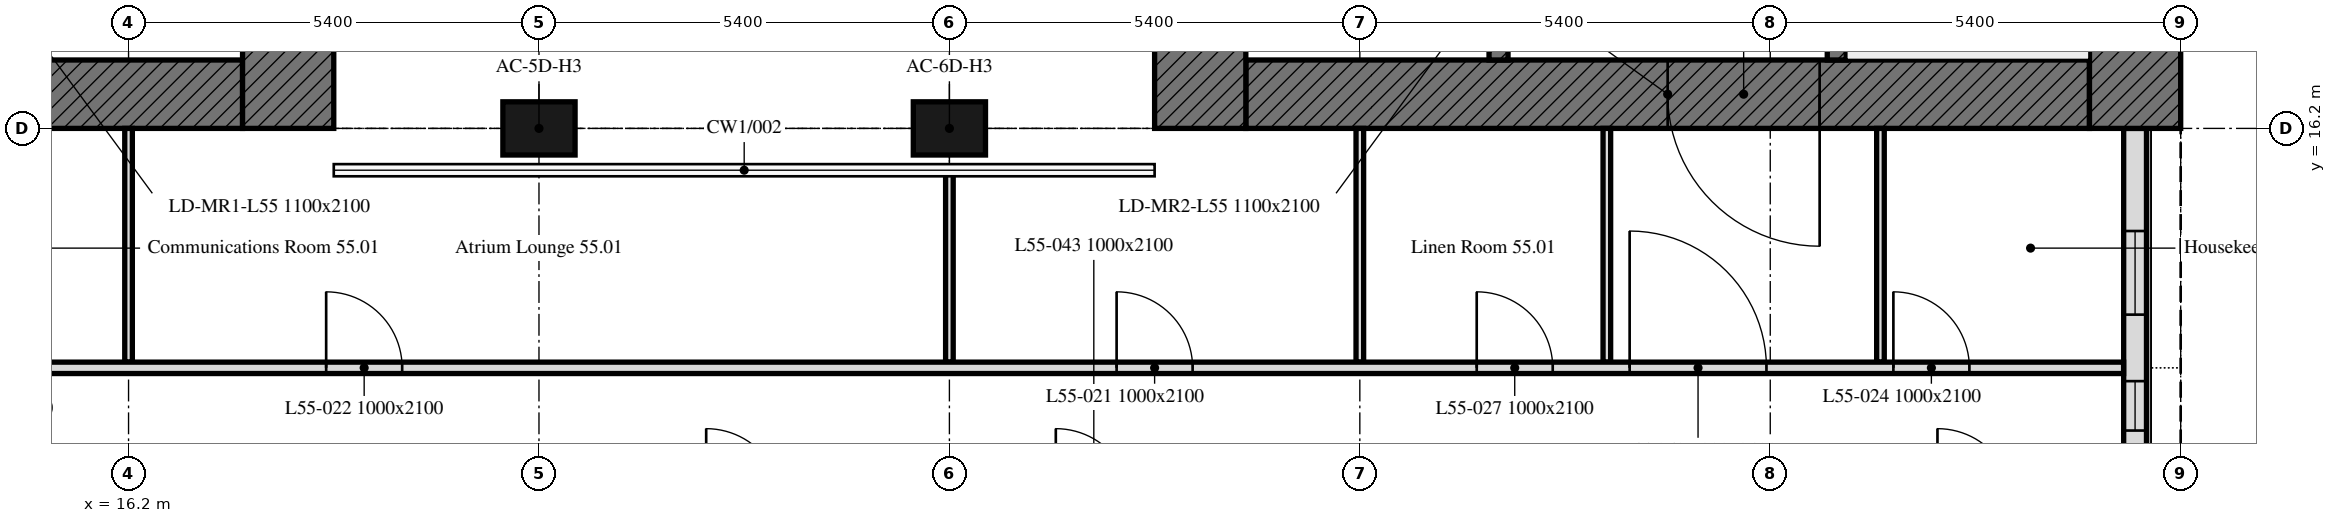
"""IFC4 building model, lengths in metres.
Left out: names, types, materials, properties, quantities, classifications, styles, units other than length and angle.
Written with IfcOpenShell. Run it as: python <this file> out.ifc"""

import sys

from ifc_helpers import new_model, si_unit, direction, frame, frame_2d, origin, origin_2d, place, context, subcontext, project, spatial, rectangle, extrude, element, fill, save


model = new_model("IFC4")
c1 = context("Model", 3, precision=1e-05, world=origin(), true_north=direction((0.0, 1.0)))
c2 = subcontext(c1, "Body", "Model", "MODEL_VIEW")
j1 = project(units=[si_unit("LENGTHUNIT", "METRE"), si_unit("PLANEANGLEUNIT", "RADIAN")], contexts=[c1])
p1 = place(None, origin())
s1 = spatial("IfcSite", under=j1, at=p1, CompositionType="ELEMENT")
p2 = place(p1, origin())
s2 = spatial("IfcBuilding", under=s1, at=p2, CompositionType="ELEMENT")
p3 = place(p2, frame((0.0, 0.0, 220.3)))
s3 = spatial("IfcBuildingStorey", under=s2, at=p3, CompositionType="ELEMENT", Elevation=220.3)
for number, where, z_axis, x_axis in (
    (1, (21.6, 16.2, 0.0), (0.0, 0.0, 1.0), (1.0, 0.0, 0.0)),
    (2, (27.0, 16.2, 0.0), (0.0, 0.0, 1.0), (1.0, 0.0, 0.0)),
):
    element("IfcColumn", number, at=place(p3, frame(where, z_axis=z_axis, x_axis=x_axis)), inside=s3, PredefinedType="COLUMN", context=c2, shape_type="SweptSolid", body=[
        extrude(rectangle(XDim=0.95, YDim=0.7, at=origin_2d()), origin(), (0.0, 0.0, 1.0), 3.0),
    ])
p4 = place(p3, frame((42.6, 10.986, 0.0), z_axis=(0.0, 0.0, 1.0), x_axis=(0.0, 1.0, 0.0)))
e3 = element("IfcWall", 3, at=p4, inside=s3, PredefinedType="SOLIDWALL", context=c2, shape_type="SweptSolid", body=[
    extrude(rectangle(XDim=5.214, YDim=0.3, at=frame_2d((2.607, 0.0))), origin(), (0.0, 0.0, 1.0), 3.0),
])
p5 = place(p4, frame((1.239, 0.0, 0.9)))
e4 = element("IfcOpeningElement", 4, at=p5, cuts=e3, PredefinedType="OPENING", context=c2, shape_type="SweptSolid", body=[
    extrude(rectangle(XDim=0.65, YDim=1.7, at=frame_2d((0.325, 0.85))), frame((0.0, 0.16, 0.0), z_axis=(0.0, -1.0, 0.0), x_axis=(1.0, 0.0, 0.0)), (0.0, 0.0, 1.0), 0.32),
])
p6 = place(p4, frame((2.764, 0.0, 0.9)))
e5 = element("IfcOpeningElement", 5, at=p6, cuts=e3, PredefinedType="OPENING", context=c2, shape_type="SweptSolid", body=[
    extrude(rectangle(XDim=1.1, YDim=1.7, at=frame_2d((0.55, 0.85))), frame((0.0, 0.16, 0.0), z_axis=(0.0, -1.0, 0.0), x_axis=(1.0, 0.0, 0.0)), (0.0, 0.0, 1.0), 0.32),
])
p7 = place(p3, frame((17.7, 16.65, 0.0), z_axis=(0.0, 0.0, 1.0), x_axis=(-1.0, 0.0, 0.0)))
e6 = element("IfcWall", 6, at=p7, inside=s3, PredefinedType="SOLIDWALL", context=c2, shape_type="SweptSolid", body=[
    extrude(rectangle(XDim=11.1, YDim=0.9, at=frame_2d((5.55, 0.0))), origin(), (0.0, 0.0, 1.0), 3.0),
])
p8 = place(p7, frame((5.55, 0.0, 0.0)))
e7 = element("IfcOpeningElement", 7, at=p8, cuts=e6, PredefinedType="OPENING", context=c2, shape_type="SweptSolid", body=[
    extrude(rectangle(XDim=2.0, YDim=2.4, at=frame_2d((1.0, 1.2))), frame((0.0, 0.45, 0.0), z_axis=(0.0, -1.0, 0.0), x_axis=(1.0, 0.0, 0.0)), (0.0, 0.0, 1.0), 0.9),
])
p9 = place(p3, frame((18.3, 32.4, 0.0), z_axis=(0.0, 0.0, 1.0), x_axis=(0.0, -1.0, 0.0)))
e8 = element("IfcWall", 8, at=p9, inside=s3, PredefinedType="SOLIDWALL", context=c2, shape_type="SweptSolid", body=[
    extrude(rectangle(XDim=16.2, YDim=1.2, at=frame_2d((8.1, 0.0))), origin(), (0.0, 0.0, 1.0), 3.0),
])
p10 = place(p3, frame((42.0, 16.65, 0.0), z_axis=(0.0, 0.0, 1.0), x_axis=(-1.0, 0.0, 0.0)))
e9 = element("IfcWall", 9, at=p10, inside=s3, PredefinedType="SOLIDWALL", context=c2, shape_type="SweptSolid", body=[
    extrude(rectangle(XDim=11.1, YDim=0.9, at=frame_2d((5.55, 0.0))), origin(), (0.0, 0.0, 1.0), 3.0),
])
p11 = place(p10, frame((3.55, 0.0, 0.0)))
e10 = element("IfcOpeningElement", 10, at=p11, cuts=e9, PredefinedType="OPENING", context=c2, shape_type="SweptSolid", body=[
    extrude(rectangle(XDim=2.0, YDim=2.4, at=frame_2d((1.0, 1.2))), frame((0.0, 0.45, 0.0), z_axis=(0.0, -1.0, 0.0), x_axis=(1.0, 0.0, 0.0)), (0.0, 0.0, 1.0), 0.9),
])
for number, where, z_axis, x_axis in (
    (11, (42.6, 32.4, 0.0), (0.0, 0.0, 1.0), (0.0, -1.0, 0.0)),
    (12, (30.3, 16.2, 0.0), (0.0, 0.0, 1.0), (0.0, 1.0, 0.0)),
):
    element("IfcWall", number, at=place(p3, frame(where, z_axis=z_axis, x_axis=x_axis)), inside=s3, PredefinedType="SOLIDWALL", context=c2, shape_type="SweptSolid", body=[
        extrude(rectangle(XDim=16.2, YDim=1.2, at=frame_2d((8.1, 0.0))), origin(), (0.0, 0.0, 1.0), 3.0),
    ])
p12 = place(p3, frame((38.675, 17.1, 0.0), z_axis=(0.0, 0.0, 1.0), x_axis=(0.0, 1.0, 0.0)))
e13 = element("IfcWall", 13, at=p12, inside=s3, PredefinedType="SOLIDWALL", context=c2, shape_type="SweptSolid", body=[
    extrude(rectangle(XDim=14.4, YDim=0.25, at=frame_2d((7.2, 0.0))), origin(), (0.0, 0.0, 1.0), 3.0),
])
p13 = place(p12, frame((4.6, 0.0, 0.0)))
e14 = element("IfcOpeningElement", 14, at=p13, cuts=e13, PredefinedType="OPENING", context=c2, shape_type="SweptSolid", body=[
    extrude(rectangle(XDim=1.0, YDim=2.1, at=frame_2d((0.5, 1.05))), frame((0.0, 0.125, 0.0), z_axis=(0.0, -1.0, 0.0), x_axis=(1.0, 0.0, 0.0)), (0.0, 0.0, 1.0), 0.25),
])
p14 = place(p12, frame((7.062, 0.0, 0.0)))
e15 = element("IfcOpeningElement", 15, at=p14, cuts=e13, PredefinedType="OPENING", context=c2, shape_type="SweptSolid", body=[
    extrude(rectangle(XDim=1.2, YDim=2.1, at=frame_2d((0.6, 1.05))), frame((0.0, 0.125, 0.0), z_axis=(0.0, -1.0, 0.0), x_axis=(1.0, 0.0, 0.0)), (0.0, 0.0, 1.0), 0.25),
])
p15 = place(p12, frame((9.599, 0.0, 0.0)))
e16 = element("IfcOpeningElement", 16, at=p15, cuts=e13, PredefinedType="OPENING", context=c2, shape_type="SweptSolid", body=[
    extrude(rectangle(XDim=0.9, YDim=2.1, at=frame_2d((0.45, 1.05))), frame((0.0, 0.125, 0.0), z_axis=(0.0, -1.0, 0.0), x_axis=(1.0, 0.0, 0.0)), (0.0, 0.0, 1.0), 0.25),
])
p16 = place(p12, frame((11.032, 0.0, 0.0)))
e17 = element("IfcOpeningElement", 17, at=p16, cuts=e13, PredefinedType="OPENING", context=c2, shape_type="SweptSolid", body=[
    extrude(rectangle(XDim=0.9, YDim=2.1, at=frame_2d((0.45, 1.05))), frame((0.0, 0.125, 0.0), z_axis=(0.0, -1.0, 0.0), x_axis=(1.0, 0.0, 0.0)), (0.0, 0.0, 1.0), 0.25),
])
p17 = place(p12, frame((12.846, 0.0, 0.0)))
e18 = element("IfcOpeningElement", 18, at=p17, cuts=e13, PredefinedType="OPENING", context=c2, shape_type="SweptSolid", body=[
    extrude(rectangle(XDim=0.9, YDim=2.1, at=frame_2d((0.45, 1.05))), frame((0.0, 0.125, 0.0), z_axis=(0.0, -1.0, 0.0), x_axis=(1.0, 0.0, 0.0)), (0.0, 0.0, 1.0), 0.25),
])
p18 = place(p3, frame((34.225, 17.1, 0.0), z_axis=(0.0, 0.0, 1.0), x_axis=(0.0, 1.0, 0.0)))
e19 = element("IfcWall", 19, at=p18, inside=s3, PredefinedType="SOLIDWALL", context=c2, shape_type="SweptSolid", body=[
    extrude(rectangle(XDim=14.4, YDim=0.25, at=frame_2d((7.2, 0.0))), origin(), (0.0, 0.0, 1.0), 3.0),
])
p19 = place(p18, frame((13.15, 0.0, 0.0)))
e20 = element("IfcOpeningElement", 20, at=p19, cuts=e19, PredefinedType="OPENING", context=c2, shape_type="SweptSolid", body=[
    extrude(rectangle(XDim=1.0, YDim=2.1, at=frame_2d((0.5, 1.05))), frame((0.0, 0.125, 0.0), z_axis=(0.0, -1.0, 0.0), x_axis=(1.0, 0.0, 0.0)), (0.0, 0.0, 1.0), 0.25),
])
p20 = place(p18, frame((0.6, 0.0, 0.0)))
e21 = element("IfcOpeningElement", 21, at=p20, cuts=e19, PredefinedType="OPENING", context=c2, shape_type="SweptSolid", body=[
    extrude(rectangle(XDim=1.1, YDim=2.1, at=frame_2d((0.55, 1.05))), frame((0.0, 0.125, 0.0), z_axis=(0.0, -1.0, 0.0), x_axis=(1.0, 0.0, 0.0)), (0.0, 0.0, 1.0), 0.25),
])
p21 = place(p18, frame((3.25, 0.0, 0.0)))
e22 = element("IfcOpeningElement", 22, at=p21, cuts=e19, PredefinedType="OPENING", context=c2, shape_type="SweptSolid", body=[
    extrude(rectangle(XDim=0.9, YDim=2.1, at=frame_2d((0.45, 1.05))), frame((0.0, 0.125, 0.0), z_axis=(0.0, -1.0, 0.0), x_axis=(1.0, 0.0, 0.0)), (0.0, 0.0, 1.0), 0.25),
])
p22 = place(p3, frame((32.4, 13.125, 0.0), z_axis=(0.0, 0.0, 1.0), x_axis=(0.0, 1.0, 0.0)))
e23 = element("IfcWall", 23, at=p22, inside=s3, PredefinedType="PARTITIONING", context=c2, shape_type="SweptSolid", body=[
    extrude(rectangle(XDim=3.075, YDim=0.1, at=frame_2d((1.538, 0.0))), origin(), (0.0, 0.0, 1.0), 3.0),
])
p23 = place(p3, frame((27.0, 15.705, 0.0), z_axis=(0.0, 0.0, 1.0), x_axis=(0.0, -1.0, 0.0)))
e24 = element("IfcWall", 24, at=p23, inside=s3, PredefinedType="PARTITIONING", context=c2, shape_type="SweptSolid", body=[
    extrude(rectangle(XDim=2.58, YDim=0.1, at=frame_2d((1.29, 0.0))), origin(), (0.0, 0.0, 1.0), 3.0),
])
for number, where, z_axis, x_axis in (
    (25, (16.2, 16.2, 0.0), (0.0, 0.0, 1.0), (0.0, -1.0, 0.0)),
    (26, (39.25, 13.125, 0.0), (0.0, 0.0, 1.0), (0.0, 1.0, 0.0)),
    (27, (35.65, 16.2, 0.0), (0.0, 0.0, 1.0), (0.0, -1.0, 0.0)),
):
    element("IfcWall", number, at=place(p3, frame(where, z_axis=z_axis, x_axis=x_axis)), inside=s3, PredefinedType="PARTITIONING", context=c2, shape_type="SweptSolid", body=[
        extrude(rectangle(XDim=3.075, YDim=0.1, at=frame_2d((1.538, 0.0))), origin(), (0.0, 0.0, 1.0), 3.0),
    ])
p24 = place(p3, frame((5.325, 13.05, 0.0), z_axis=(0.0, 0.0, 1.0), x_axis=(1.0, 0.0, 0.0)))
e28 = element("IfcWall", 28, at=p24, inside=s3, PredefinedType="PARTITIONING", context=c2, shape_type="SweptSolid", body=[
    extrude(rectangle(XDim=37.124, YDim=0.15, at=frame_2d((18.562, 0.0))), origin(), (0.0, 0.0, 1.0), 3.0),
])
p25 = place(p24, frame((23.875, 0.0, 0.0)))
e29 = element("IfcOpeningElement", 29, at=p25, cuts=e28, PredefinedType="OPENING", context=c2, shape_type="SweptSolid", body=[
    extrude(rectangle(XDim=1.0, YDim=2.1, at=frame_2d((0.5, 1.05))), frame((0.0, 0.075, 0.0), z_axis=(0.0, -1.0, 0.0), x_axis=(1.0, 0.0, 0.0)), (0.0, 0.0, 1.0), 0.15),
])
p26 = place(p24, frame((13.475, 0.0, 0.0)))
e30 = element("IfcOpeningElement", 30, at=p26, cuts=e28, PredefinedType="OPENING", context=c2, shape_type="SweptSolid", body=[
    extrude(rectangle(XDim=1.0, YDim=2.1, at=frame_2d((0.5, 1.05))), frame((0.0, 0.075, 0.0), z_axis=(0.0, -1.0, 0.0), x_axis=(1.0, 0.0, 0.0)), (0.0, 0.0, 1.0), 0.15),
])
p27 = place(p24, frame((34.095, 0.0, 0.0)))
e31 = element("IfcOpeningElement", 31, at=p27, cuts=e28, PredefinedType="OPENING", context=c2, shape_type="SweptSolid", body=[
    extrude(rectangle(XDim=1.0, YDim=2.1, at=frame_2d((0.5, 1.05))), frame((0.0, 0.075, 0.0), z_axis=(0.0, -1.0, 0.0), x_axis=(1.0, 0.0, 0.0)), (0.0, 0.0, 1.0), 0.15),
])
p28 = place(p24, frame((8.337, 0.0, 0.0)))
e32 = element("IfcOpeningElement", 32, at=p28, cuts=e28, PredefinedType="OPENING", context=c2, shape_type="SweptSolid", body=[
    extrude(rectangle(XDim=1.0, YDim=2.1, at=frame_2d((0.5, 1.05))), frame((0.0, 0.075, 0.0), z_axis=(0.0, -1.0, 0.0), x_axis=(1.0, 0.0, 0.0)), (0.0, 0.0, 1.0), 0.15),
])
p29 = place(p24, frame((1.648, 0.0, 0.0)))
e33 = element("IfcOpeningElement", 33, at=p29, cuts=e28, PredefinedType="OPENING", context=c2, shape_type="SweptSolid", body=[
    extrude(rectangle(XDim=1.0, YDim=2.1, at=frame_2d((0.5, 1.05))), frame((0.0, 0.075, 0.0), z_axis=(0.0, -1.0, 0.0), x_axis=(1.0, 0.0, 0.0)), (0.0, 0.0, 1.0), 0.15),
])
p30 = place(p24, frame((28.613, 0.0, 0.0)))
e34 = element("IfcOpeningElement", 34, at=p30, cuts=e28, PredefinedType="OPENING", context=c2, shape_type="SweptSolid", body=[
    extrude(rectangle(XDim=1.0, YDim=2.1, at=frame_2d((0.5, 1.05))), frame((0.0, 0.075, 0.0), z_axis=(0.0, -1.0, 0.0), x_axis=(1.0, 0.0, 0.0)), (0.0, 0.0, 1.0), 0.15),
])
p31 = place(p24, frame((30.625, 0.0, 0.0)))
e35 = element("IfcOpeningElement", 35, at=p31, cuts=e28, PredefinedType="OPENING", context=c2, shape_type="SweptSolid", body=[
    extrude(rectangle(XDim=1.8, YDim=2.4, at=frame_2d((0.9, 1.2))), frame((0.0, 0.075, 0.0), z_axis=(0.0, -1.0, 0.0), x_axis=(1.0, 0.0, 0.0)), (0.0, 0.0, 1.0), 0.15),
])
p32 = place(p24, frame((5.525, 0.0, 0.0)))
e36 = element("IfcOpeningElement", 36, at=p32, cuts=e28, PredefinedType="OPENING", context=c2, shape_type="SweptSolid", body=[
    extrude(rectangle(XDim=1.8, YDim=2.4, at=frame_2d((0.9, 1.2))), frame((0.0, 0.075, 0.0), z_axis=(0.0, -1.0, 0.0), x_axis=(1.0, 0.0, 0.0)), (0.0, 0.0, 1.0), 0.15),
])
p33 = place(p5, origin())
e37 = element("IfcWindow", 37, at=p33, inside=s3, PartitioningType="SINGLE_PANEL", PredefinedType="WINDOW", context=c2, shape_type="SweptSolid", body=[
    extrude(rectangle(XDim=0.65, YDim=1.7, at=frame_2d((0.325, 0.85))), frame((0.0, 0.03, 0.0), z_axis=(0.0, -1.0, 0.0), x_axis=(1.0, 0.0, 0.0)), (0.0, 0.0, 1.0), 0.06),
])
fill(e4, e37)
p34 = place(p6, origin())
e38 = element("IfcWindow", 38, at=p34, inside=s3, PartitioningType="SINGLE_PANEL", PredefinedType="WINDOW", context=c2, shape_type="SweptSolid", body=[
    extrude(rectangle(XDim=1.1, YDim=1.7, at=frame_2d((0.55, 0.85))), frame((0.0, 0.03, 0.0), z_axis=(0.0, -1.0, 0.0), x_axis=(1.0, 0.0, 0.0)), (0.0, 0.0, 1.0), 0.06),
])
fill(e5, e38)
p35 = place(p11, origin())
e39 = element("IfcDoor", 39, at=p35, inside=s3, OperationType="DOUBLE_DOOR_SINGLE_SWING", PredefinedType="DOOR", context=c2, shape_type="SweptSolid", body=[
    extrude(rectangle(XDim=2.0, YDim=2.4, at=frame_2d((1.0, 1.2))), frame((0.0, 0.025, 0.0), z_axis=(0.0, -1.0, 0.0), x_axis=(1.0, 0.0, 0.0)), (0.0, 0.0, 1.0), 0.05),
])
fill(e10, e39)
p36 = place(p25, origin())
e40 = element("IfcDoor", 40, at=p36, inside=s3, OperationType="SINGLE_SWING_RIGHT", PredefinedType="DOOR", context=c2, shape_type="SweptSolid", body=[
    extrude(rectangle(XDim=1.0, YDim=2.1, at=frame_2d((0.5, 1.05))), frame((0.0, 0.025, 0.0), z_axis=(0.0, -1.0, 0.0), x_axis=(1.0, 0.0, 0.0)), (0.0, 0.0, 1.0), 0.05),
])
fill(e29, e40)
p37 = place(p26, origin())
e41 = element("IfcDoor", 41, at=p37, inside=s3, OperationType="SINGLE_SWING_RIGHT", PredefinedType="DOOR", context=c2, shape_type="SweptSolid", body=[
    extrude(rectangle(XDim=1.0, YDim=2.1, at=frame_2d((0.5, 1.05))), frame((0.0, 0.025, 0.0), z_axis=(0.0, -1.0, 0.0), x_axis=(1.0, 0.0, 0.0)), (0.0, 0.0, 1.0), 0.05),
])
fill(e30, e41)
p38 = place(p27, origin())
e42 = element("IfcDoor", 42, at=p38, inside=s3, OperationType="SINGLE_SWING_LEFT", PredefinedType="DOOR", context=c2, shape_type="SweptSolid", body=[
    extrude(rectangle(XDim=1.0, YDim=2.1, at=frame_2d((0.5, 1.05))), frame((0.0, 0.025, 0.0), z_axis=(0.0, -1.0, 0.0), x_axis=(1.0, 0.0, 0.0)), (0.0, 0.0, 1.0), 0.05),
])
fill(e31, e42)
p39 = place(p30, origin())
e43 = element("IfcDoor", 43, at=p39, inside=s3, OperationType="SINGLE_SWING_RIGHT", PredefinedType="DOOR", context=c2, shape_type="SweptSolid", body=[
    extrude(rectangle(XDim=1.0, YDim=2.1, at=frame_2d((0.5, 1.05))), frame((0.0, 0.025, 0.0), z_axis=(0.0, -1.0, 0.0), x_axis=(1.0, 0.0, 0.0)), (0.0, 0.0, 1.0), 0.05),
])
fill(e34, e43)
p40 = place(p31, origin())
e44 = element("IfcDoor", 44, at=p40, inside=s3, OperationType="DOUBLE_DOOR_SINGLE_SWING", PredefinedType="DOOR", context=c2, shape_type="SweptSolid", body=[
    extrude(rectangle(XDim=1.8, YDim=2.4, at=frame_2d((0.9, 1.2))), frame((0.0, 0.025, 0.0), z_axis=(0.0, -1.0, 0.0), x_axis=(1.0, 0.0, 0.0)), (0.0, 0.0, 1.0), 0.05),
])
fill(e35, e44)
save(model, sys.argv[1])
